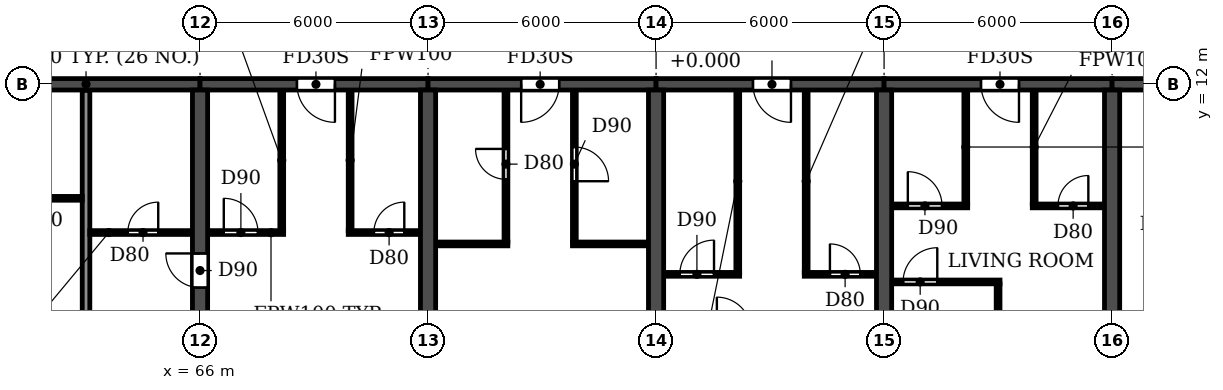
"""IFC4 building model, lengths in metres.
Left out: names, types, materials, properties, quantities, classifications, styles, units other than length and angle.
Written with IfcOpenShell. Run it as: python <this file> out.ifc"""

import sys

from ifc_helpers import new_model, si_unit, direction, frame, frame_2d, origin, place, context, subcontext, project, spatial, rectangle, extrude, element, fill, save


model = new_model("IFC4")
c1 = context("Model", 3, precision=1e-05, world=origin(), true_north=direction((0.0, 1.0)))
c2 = subcontext(c1, "Body", "Model", "MODEL_VIEW")
j1 = project(units=[si_unit("LENGTHUNIT", "METRE"), si_unit("PLANEANGLEUNIT", "RADIAN")], contexts=[c1])
p1 = place(None, origin())
s1 = spatial("IfcSite", under=j1, at=p1, CompositionType="ELEMENT")
p2 = place(p1, origin())
s2 = spatial("IfcBuilding", under=s1, at=p2, CompositionType="ELEMENT")
p3 = place(p2, frame((0.0, 0.0, 56.4)))
s3 = spatial("IfcBuildingStorey", under=s2, at=p3, CompositionType="ELEMENT", Elevation=56.4)
p4 = place(p3, frame((66.0, 0.2, 0.0), z_axis=(0.0, 0.0, 1.0), x_axis=(0.0, 1.0, 0.0)))
e1 = element("IfcWall", 1, at=p4, inside=s3, PredefinedType="SHEAR", context=c2, shape_type="SweptSolid", body=[
    extrude(rectangle(XDim=11.65, YDim=0.4, at=frame_2d((5.825, 0.0))), origin(), (0.0, 0.0, 1.0), 3.05),
])
p5 = place(p4, frame((6.45, 0.0, 0.0)))
e2 = element("IfcOpeningElement", 2, at=p5, cuts=e1, PredefinedType="OPENING", context=c2, shape_type="SweptSolid", body=[
    extrude(rectangle(XDim=0.9, YDim=2.1, at=frame_2d((0.45, 1.05))), frame((0.0, 0.21, 0.0), z_axis=(0.0, -1.0, 0.0), x_axis=(1.0, 0.0, 0.0)), (0.0, 0.0, 1.0), 0.42),
])
for number, where, z_axis, x_axis in (
    (3, (72.0, 0.2, 0.0), (0.0, 0.0, 1.0), (0.0, 1.0, 0.0)),
    (4, (78.0, 0.2, 0.0), (0.0, 0.0, 1.0), (0.0, 1.0, 0.0)),
    (5, (84.0, 0.2, 0.0), (0.0, 0.0, 1.0), (0.0, 1.0, 0.0)),
    (6, (90.0, 0.2, 0.0), (0.0, 0.0, 1.0), (0.0, 1.0, 0.0)),
):
    element("IfcWall", number, at=place(p3, frame(where, z_axis=z_axis, x_axis=x_axis)), inside=s3, PredefinedType="SHEAR", context=c2, shape_type="SweptSolid", body=[
        extrude(rectangle(XDim=11.65, YDim=0.4, at=frame_2d((5.825, 0.0))), origin(), (0.0, 0.0, 1.0), 3.05),
    ])
p6 = place(p3, frame((60.0, 12.0, 0.0), z_axis=(0.0, 0.0, 1.0), x_axis=(1.0, 0.0, 0.0)))
e7 = element("IfcWall", 7, at=p6, inside=s3, PredefinedType="SHEAR", context=c2, shape_type="SweptSolid", body=[
    extrude(rectangle(XDim=6.0, YDim=0.3, at=frame_2d((3.0, 0.0))), origin(), (0.0, 0.0, 1.0), 2.45),
])
p7 = place(p3, frame((66.0, 12.0, 0.0), z_axis=(0.0, 0.0, 1.0), x_axis=(1.0, 0.0, 0.0)))
e8 = element("IfcWall", 8, at=p7, inside=s3, PredefinedType="SHEAR", context=c2, shape_type="SweptSolid", body=[
    extrude(rectangle(XDim=6.0, YDim=0.3, at=frame_2d((3.0, 0.0))), origin(), (0.0, 0.0, 1.0), 2.45),
])
p8 = place(p7, frame((2.55, 0.0, 0.0)))
e9 = element("IfcOpeningElement", 9, at=p8, cuts=e8, PredefinedType="OPENING", context=c2, shape_type="SweptSolid", body=[
    extrude(rectangle(XDim=1.0, YDim=2.1, at=frame_2d((0.5, 1.05))), frame((0.0, 0.16, 0.0), z_axis=(0.0, -1.0, 0.0), x_axis=(1.0, 0.0, 0.0)), (0.0, 0.0, 1.0), 0.32),
])
p9 = place(p3, frame((72.0, 12.0, 0.0), z_axis=(0.0, 0.0, 1.0), x_axis=(1.0, 0.0, 0.0)))
e10 = element("IfcWall", 10, at=p9, inside=s3, PredefinedType="SHEAR", context=c2, shape_type="SweptSolid", body=[
    extrude(rectangle(XDim=6.0, YDim=0.3, at=frame_2d((3.0, 0.0))), origin(), (0.0, 0.0, 1.0), 2.45),
])
p10 = place(p9, frame((2.45, 0.0, 0.0)))
e11 = element("IfcOpeningElement", 11, at=p10, cuts=e10, PredefinedType="OPENING", context=c2, shape_type="SweptSolid", body=[
    extrude(rectangle(XDim=1.0, YDim=2.1, at=frame_2d((0.5, 1.05))), frame((0.0, 0.16, 0.0), z_axis=(0.0, -1.0, 0.0), x_axis=(1.0, 0.0, 0.0)), (0.0, 0.0, 1.0), 0.32),
])
p11 = place(p3, frame((78.0, 12.0, 0.0), z_axis=(0.0, 0.0, 1.0), x_axis=(1.0, 0.0, 0.0)))
e12 = element("IfcWall", 12, at=p11, inside=s3, PredefinedType="SHEAR", context=c2, shape_type="SweptSolid", body=[
    extrude(rectangle(XDim=6.0, YDim=0.3, at=frame_2d((3.0, 0.0))), origin(), (0.0, 0.0, 1.0), 2.45),
])
p12 = place(p11, frame((2.55, 0.0, 0.0)))
e13 = element("IfcOpeningElement", 13, at=p12, cuts=e12, PredefinedType="OPENING", context=c2, shape_type="SweptSolid", body=[
    extrude(rectangle(XDim=1.0, YDim=2.1, at=frame_2d((0.5, 1.05))), frame((0.0, 0.16, 0.0), z_axis=(0.0, -1.0, 0.0), x_axis=(1.0, 0.0, 0.0)), (0.0, 0.0, 1.0), 0.32),
])
p13 = place(p3, frame((84.0, 12.0, 0.0), z_axis=(0.0, 0.0, 1.0), x_axis=(1.0, 0.0, 0.0)))
e14 = element("IfcWall", 14, at=p13, inside=s3, PredefinedType="SHEAR", context=c2, shape_type="SweptSolid", body=[
    extrude(rectangle(XDim=6.0, YDim=0.3, at=frame_2d((3.0, 0.0))), origin(), (0.0, 0.0, 1.0), 2.45),
])
p14 = place(p13, frame((2.55, 0.0, 0.0)))
e15 = element("IfcOpeningElement", 15, at=p14, cuts=e14, PredefinedType="OPENING", context=c2, shape_type="SweptSolid", body=[
    extrude(rectangle(XDim=1.0, YDim=2.1, at=frame_2d((0.5, 1.05))), frame((0.0, 0.16, 0.0), z_axis=(0.0, -1.0, 0.0), x_axis=(1.0, 0.0, 0.0)), (0.0, 0.0, 1.0), 0.32),
])
p15 = place(p3, frame((90.0, 12.0, 0.0), z_axis=(0.0, 0.0, 1.0), x_axis=(1.0, 0.0, 0.0)))
e16 = element("IfcWall", 16, at=p15, inside=s3, PredefinedType="SHEAR", context=c2, shape_type="SweptSolid", body=[
    extrude(rectangle(XDim=5.8, YDim=0.3, at=frame_2d((2.9, 0.0))), origin(), (0.0, 0.0, 1.0), 2.45),
])
p16 = place(p15, frame((2.5, 0.0, 0.0)))
e17 = element("IfcOpeningElement", 17, at=p16, cuts=e16, PredefinedType="OPENING", context=c2, shape_type="SweptSolid", body=[
    extrude(rectangle(XDim=1.0, YDim=2.1, at=frame_2d((0.5, 1.05))), frame((0.0, 0.16, 0.0), z_axis=(0.0, -1.0, 0.0), x_axis=(1.0, 0.0, 0.0)), (0.0, 0.0, 1.0), 0.32),
])
p17 = place(p3, frame((63.0, 0.06, 0.0), z_axis=(0.0, 0.0, 1.0), x_axis=(0.0, 1.0, 0.0)))
e18 = element("IfcWall", 18, at=p17, inside=s3, PredefinedType="PARTITIONING", context=c2, shape_type="SweptSolid", body=[
    extrude(rectangle(XDim=11.78, YDim=0.2, at=frame_2d((5.89, 0.0))), origin(), (0.0, 0.0, 1.0), 3.05),
])
p18 = place(p3, frame((84.21, 6.8, 0.0), z_axis=(0.0, 0.0, 1.0), x_axis=(1.0, 0.0, 0.0)))
e19 = element("IfcWall", 19, at=p18, inside=s3, PredefinedType="PARTITIONING", context=c2, shape_type="SweptSolid", body=[
    extrude(rectangle(XDim=2.84, YDim=0.1, at=frame_2d((1.42, 0.0))), origin(), (0.0, 0.0, 1.0), 3.05),
])
p19 = place(p18, frame((0.29, 0.0, 0.0)))
e20 = element("IfcOpeningElement", 20, at=p19, cuts=e19, PredefinedType="OPENING", context=c2, shape_type="SweptSolid", body=[
    extrude(rectangle(XDim=0.9, YDim=2.1, at=frame_2d((0.45, 1.05))), frame((0.0, 0.06, 0.0), z_axis=(0.0, -1.0, 0.0), x_axis=(1.0, 0.0, 0.0)), (0.0, 0.0, 1.0), 0.12),
])
p20 = place(p3, frame((78.21, 7.0, 0.0), z_axis=(0.0, 0.0, 1.0), x_axis=(1.0, 0.0, 0.0)))
e21 = element("IfcWall", 21, at=p20, inside=s3, PredefinedType="PARTITIONING", context=c2, shape_type="SweptSolid", body=[
    extrude(rectangle(XDim=1.99, YDim=0.1, at=frame_2d((0.995, 0.0))), origin(), (0.0, 0.0, 1.0), 3.05),
])
p21 = place(p20, frame((0.415, 0.0, 0.0)))
e22 = element("IfcOpeningElement", 22, at=p21, cuts=e21, PredefinedType="OPENING", context=c2, shape_type="SweptSolid", body=[
    extrude(rectangle(XDim=0.9, YDim=2.1, at=frame_2d((0.45, 1.05))), frame((0.0, 0.06, 0.0), z_axis=(0.0, -1.0, 0.0), x_axis=(1.0, 0.0, 0.0)), (0.0, 0.0, 1.0), 0.12),
])
p22 = place(p3, frame((81.9, 7.0, 0.0), z_axis=(0.0, 0.0, 1.0), x_axis=(1.0, 0.0, 0.0)))
e23 = element("IfcWall", 23, at=p22, inside=s3, PredefinedType="PARTITIONING", context=c2, shape_type="SweptSolid", body=[
    extrude(rectangle(XDim=1.89, YDim=0.1, at=frame_2d((0.945, 0.0))), origin(), (0.0, 0.0, 1.0), 3.05),
])
p23 = place(p22, frame((0.675, 0.0, 0.0)))
e24 = element("IfcOpeningElement", 24, at=p23, cuts=e23, PredefinedType="OPENING", context=c2, shape_type="SweptSolid", body=[
    extrude(rectangle(XDim=0.8, YDim=2.1, at=frame_2d((0.4, 1.05))), frame((0.0, 0.06, 0.0), z_axis=(0.0, -1.0, 0.0), x_axis=(1.0, 0.0, 0.0)), (0.0, 0.0, 1.0), 0.12),
])
p24 = place(p3, frame((72.21, 7.8, 0.0), z_axis=(0.0, 0.0, 1.0), x_axis=(1.0, 0.0, 0.0)))
e25 = element("IfcWall", 25, at=p24, inside=s3, PredefinedType="PARTITIONING", context=c2, shape_type="SweptSolid", body=[
    extrude(rectangle(XDim=1.89, YDim=0.1, at=frame_2d((0.945, 0.0))), origin(), (0.0, 0.0, 1.0), 3.05),
])
p25 = place(p3, frame((75.8, 7.8, 0.0), z_axis=(0.0, 0.0, 1.0), x_axis=(1.0, 0.0, 0.0)))
e26 = element("IfcWall", 26, at=p25, inside=s3, PredefinedType="PARTITIONING", context=c2, shape_type="SweptSolid", body=[
    extrude(rectangle(XDim=1.99, YDim=0.1, at=frame_2d((0.995, 0.0))), origin(), (0.0, 0.0, 1.0), 3.05),
])
p26 = place(p3, frame((63.1, 8.1, 0.0), z_axis=(0.0, 0.0, 1.0), x_axis=(1.0, 0.0, 0.0)))
e27 = element("IfcWall", 27, at=p26, inside=s3, PredefinedType="PARTITIONING", context=c2, shape_type="SweptSolid", body=[
    extrude(rectangle(XDim=2.69, YDim=0.1, at=frame_2d((1.345, 0.0))), origin(), (0.0, 0.0, 1.0), 3.05),
])
p27 = place(p26, frame((1.0, 0.0, 0.0)))
e28 = element("IfcOpeningElement", 28, at=p27, cuts=e27, PredefinedType="OPENING", context=c2, shape_type="SweptSolid", body=[
    extrude(rectangle(XDim=0.8, YDim=2.1, at=frame_2d((0.4, 1.05))), frame((0.0, 0.06, 0.0), z_axis=(0.0, -1.0, 0.0), x_axis=(1.0, 0.0, 0.0)), (0.0, 0.0, 1.0), 0.12),
])
p28 = place(p3, frame((66.21, 8.1, 0.0), z_axis=(0.0, 0.0, 1.0), x_axis=(1.0, 0.0, 0.0)))
e29 = element("IfcWall", 29, at=p28, inside=s3, PredefinedType="PARTITIONING", context=c2, shape_type="SweptSolid", body=[
    extrude(rectangle(XDim=1.99, YDim=0.1, at=frame_2d((0.995, 0.0))), origin(), (0.0, 0.0, 1.0), 3.05),
])
p29 = place(p28, frame((0.415, 0.0, 0.0)))
e30 = element("IfcOpeningElement", 30, at=p29, cuts=e29, PredefinedType="OPENING", context=c2, shape_type="SweptSolid", body=[
    extrude(rectangle(XDim=0.9, YDim=2.1, at=frame_2d((0.45, 1.05))), frame((0.0, 0.06, 0.0), z_axis=(0.0, -1.0, 0.0), x_axis=(1.0, 0.0, 0.0)), (0.0, 0.0, 1.0), 0.12),
])
p30 = place(p3, frame((69.9, 8.1, 0.0), z_axis=(0.0, 0.0, 1.0), x_axis=(1.0, 0.0, 0.0)))
e31 = element("IfcWall", 31, at=p30, inside=s3, PredefinedType="PARTITIONING", context=c2, shape_type="SweptSolid", body=[
    extrude(rectangle(XDim=1.89, YDim=0.1, at=frame_2d((0.945, 0.0))), origin(), (0.0, 0.0, 1.0), 3.05),
])
p31 = place(p30, frame((0.675, 0.0, 0.0)))
e32 = element("IfcOpeningElement", 32, at=p31, cuts=e31, PredefinedType="OPENING", context=c2, shape_type="SweptSolid", body=[
    extrude(rectangle(XDim=0.8, YDim=2.1, at=frame_2d((0.4, 1.05))), frame((0.0, 0.06, 0.0), z_axis=(0.0, -1.0, 0.0), x_axis=(1.0, 0.0, 0.0)), (0.0, 0.0, 1.0), 0.12),
])
p32 = place(p3, frame((84.21, 8.8, 0.0), z_axis=(0.0, 0.0, 1.0), x_axis=(1.0, 0.0, 0.0)))
e33 = element("IfcWall", 33, at=p32, inside=s3, PredefinedType="PARTITIONING", context=c2, shape_type="SweptSolid", body=[
    extrude(rectangle(XDim=1.99, YDim=0.1, at=frame_2d((0.995, 0.0))), origin(), (0.0, 0.0, 1.0), 3.05),
])
p33 = place(p32, frame((0.415, 0.0, 0.0)))
e34 = element("IfcOpeningElement", 34, at=p33, cuts=e33, PredefinedType="OPENING", context=c2, shape_type="SweptSolid", body=[
    extrude(rectangle(XDim=0.9, YDim=2.1, at=frame_2d((0.45, 1.05))), frame((0.0, 0.06, 0.0), z_axis=(0.0, -1.0, 0.0), x_axis=(1.0, 0.0, 0.0)), (0.0, 0.0, 1.0), 0.12),
])
p34 = place(p3, frame((87.9, 8.8, 0.0), z_axis=(0.0, 0.0, 1.0), x_axis=(1.0, 0.0, 0.0)))
e35 = element("IfcWall", 35, at=p34, inside=s3, PredefinedType="PARTITIONING", context=c2, shape_type="SweptSolid", body=[
    extrude(rectangle(XDim=1.89, YDim=0.1, at=frame_2d((0.945, 0.0))), origin(), (0.0, 0.0, 1.0), 3.05),
])
p35 = place(p34, frame((0.675, 0.0, 0.0)))
e36 = element("IfcOpeningElement", 36, at=p35, cuts=e35, PredefinedType="OPENING", context=c2, shape_type="SweptSolid", body=[
    extrude(rectangle(XDim=0.8, YDim=2.1, at=frame_2d((0.4, 1.05))), frame((0.0, 0.06, 0.0), z_axis=(0.0, -1.0, 0.0), x_axis=(1.0, 0.0, 0.0)), (0.0, 0.0, 1.0), 0.12),
])
p36 = place(p3, frame((60.21, 9.0, 0.0), z_axis=(0.0, 0.0, 1.0), x_axis=(1.0, 0.0, 0.0)))
e37 = element("IfcWall", 37, at=p36, inside=s3, PredefinedType="PARTITIONING", context=c2, shape_type="SweptSolid", body=[
    extrude(rectangle(XDim=2.69, YDim=0.1, at=frame_2d((1.345, 0.0))), origin(), (0.0, 0.0, 1.0), 3.05),
])
p37 = place(p36, frame((0.89, 0.0, 0.0)))
e38 = element("IfcOpeningElement", 38, at=p37, cuts=e37, PredefinedType="OPENING", context=c2, shape_type="SweptSolid", body=[
    extrude(rectangle(XDim=0.8, YDim=2.1, at=frame_2d((0.4, 1.05))), frame((0.0, 0.06, 0.0), z_axis=(0.0, -1.0, 0.0), x_axis=(1.0, 0.0, 0.0)), (0.0, 0.0, 1.0), 0.12),
])
for number, where, z_axis, x_axis in (
    (39, (68.15, 8.15, 0.0), (0.0, 0.0, 1.0), (0.0, 1.0, 0.0)),
    (40, (69.95, 8.15, 0.0), (0.0, 0.0, 1.0), (0.0, 1.0, 0.0)),
):
    element("IfcWall", number, at=place(p3, frame(where, z_axis=z_axis, x_axis=x_axis)), inside=s3, PredefinedType="PARTITIONING", context=c2, shape_type="SweptSolid", body=[
        extrude(rectangle(XDim=3.69, YDim=0.1, at=frame_2d((1.845, 0.0))), origin(), (0.0, 0.0, 1.0), 3.05),
    ])
p38 = place(p3, frame((74.05, 7.85, 0.0), z_axis=(0.0, 0.0, 1.0), x_axis=(0.0, 1.0, 0.0)))
e41 = element("IfcWall", 41, at=p38, inside=s3, PredefinedType="PARTITIONING", context=c2, shape_type="SweptSolid", body=[
    extrude(rectangle(XDim=3.99, YDim=0.1, at=frame_2d((1.995, 0.0))), origin(), (0.0, 0.0, 1.0), 3.05),
])
p39 = place(p38, frame((1.65, 0.0, 0.0)))
e42 = element("IfcOpeningElement", 42, at=p39, cuts=e41, PredefinedType="OPENING", context=c2, shape_type="SweptSolid", body=[
    extrude(rectangle(XDim=0.8, YDim=2.1, at=frame_2d((0.4, 1.05))), frame((0.0, 0.06, 0.0), z_axis=(0.0, -1.0, 0.0), x_axis=(1.0, 0.0, 0.0)), (0.0, 0.0, 1.0), 0.12),
])
p40 = place(p3, frame((75.85, 7.85, 0.0), z_axis=(0.0, 0.0, 1.0), x_axis=(0.0, 1.0, 0.0)))
e43 = element("IfcWall", 43, at=p40, inside=s3, PredefinedType="PARTITIONING", context=c2, shape_type="SweptSolid", body=[
    extrude(rectangle(XDim=3.99, YDim=0.1, at=frame_2d((1.995, 0.0))), origin(), (0.0, 0.0, 1.0), 3.05),
])
p41 = place(p40, frame((1.6, 0.0, 0.0)))
e44 = element("IfcOpeningElement", 44, at=p41, cuts=e43, PredefinedType="OPENING", context=c2, shape_type="SweptSolid", body=[
    extrude(rectangle(XDim=0.9, YDim=2.1, at=frame_2d((0.45, 1.05))), frame((0.0, 0.06, 0.0), z_axis=(0.0, -1.0, 0.0), x_axis=(1.0, 0.0, 0.0)), (0.0, 0.0, 1.0), 0.12),
])
for number, where, z_axis, x_axis in (
    (45, (80.15, 7.05, 0.0), (0.0, 0.0, 1.0), (0.0, 1.0, 0.0)),
    (46, (81.95, 7.05, 0.0), (0.0, 0.0, 1.0), (0.0, 1.0, 0.0)),
):
    element("IfcWall", number, at=place(p3, frame(where, z_axis=z_axis, x_axis=x_axis)), inside=s3, PredefinedType="PARTITIONING", context=c2, shape_type="SweptSolid", body=[
        extrude(rectangle(XDim=4.79, YDim=0.1, at=frame_2d((2.395, 0.0))), origin(), (0.0, 0.0, 1.0), 3.05),
    ])
p42 = place(p3, frame((86.15, 8.85, 0.0), z_axis=(0.0, 0.0, 1.0), x_axis=(0.0, 1.0, 0.0)))
e47 = element("IfcWall", 47, at=p42, inside=s3, PredefinedType="PARTITIONING", context=c2, shape_type="SweptSolid", body=[
    extrude(rectangle(XDim=2.99, YDim=0.1, at=frame_2d((1.495, 0.0))), origin(), (0.0, 0.0, 1.0), 3.05),
])
p43 = place(p3, frame((87.0, 0.06, 0.0), z_axis=(0.0, 0.0, 1.0), x_axis=(0.0, 1.0, 0.0)))
e48 = element("IfcWall", 48, at=p43, inside=s3, PredefinedType="PARTITIONING", context=c2, shape_type="SweptSolid", body=[
    extrude(rectangle(XDim=6.69, YDim=0.1, at=frame_2d((3.345, 0.0))), origin(), (0.0, 0.0, 1.0), 3.05),
])
p44 = place(p3, frame((87.95, 8.85, 0.0), z_axis=(0.0, 0.0, 1.0), x_axis=(0.0, 1.0, 0.0)))
e49 = element("IfcWall", 49, at=p44, inside=s3, PredefinedType="PARTITIONING", context=c2, shape_type="SweptSolid", body=[
    extrude(rectangle(XDim=2.99, YDim=0.1, at=frame_2d((1.495, 0.0))), origin(), (0.0, 0.0, 1.0), 3.05),
])
p45 = place(p27, origin())
e50 = element("IfcDoor", 50, at=p45, inside=s3, OperationType="SINGLE_SWING_RIGHT", PredefinedType="DOOR", context=c2, shape_type="SweptSolid", body=[
    extrude(rectangle(XDim=0.8, YDim=2.1, at=frame_2d((0.4, 1.05))), frame((0.0, 0.025, 0.0), z_axis=(0.0, -1.0, 0.0), x_axis=(1.0, 0.0, 0.0)), (0.0, 0.0, 1.0), 0.05),
])
fill(e28, e50)
p46 = place(p5, origin())
e51 = element("IfcDoor", 51, at=p46, inside=s3, OperationType="SINGLE_SWING_RIGHT", PredefinedType="DOOR", context=c2, shape_type="SweptSolid", body=[
    extrude(rectangle(XDim=0.9, YDim=2.1, at=frame_2d((0.45, 1.05))), frame((0.0, 0.025, 0.0), z_axis=(0.0, -1.0, 0.0), x_axis=(1.0, 0.0, 0.0)), (0.0, 0.0, 1.0), 0.05),
])
fill(e2, e51)
p47 = place(p29, origin())
e52 = element("IfcDoor", 52, at=p47, inside=s3, OperationType="SINGLE_SWING_LEFT", PredefinedType="DOOR", context=c2, shape_type="SweptSolid", body=[
    extrude(rectangle(XDim=0.9, YDim=2.1, at=frame_2d((0.45, 1.05))), frame((0.0, 0.025, 0.0), z_axis=(0.0, -1.0, 0.0), x_axis=(1.0, 0.0, 0.0)), (0.0, 0.0, 1.0), 0.05),
])
fill(e30, e52)
p48 = place(p8, frame((1.0, 0.0, 0.0), z_axis=(0.0, 0.0, 1.0), x_axis=(-1.0, 0.0, 0.0)))
e53 = element("IfcDoor", 53, at=p48, inside=s3, OperationType="SINGLE_SWING_LEFT", PredefinedType="DOOR", context=c2, shape_type="SweptSolid", body=[
    extrude(rectangle(XDim=1.0, YDim=2.1, at=frame_2d((0.5, 1.05))), frame((0.0, 0.025, 0.0), z_axis=(0.0, -1.0, 0.0), x_axis=(1.0, 0.0, 0.0)), (0.0, 0.0, 1.0), 0.05),
])
fill(e9, e53)
p49 = place(p31, origin())
e54 = element("IfcDoor", 54, at=p49, inside=s3, OperationType="SINGLE_SWING_RIGHT", PredefinedType="DOOR", context=c2, shape_type="SweptSolid", body=[
    extrude(rectangle(XDim=0.8, YDim=2.1, at=frame_2d((0.4, 1.05))), frame((0.0, 0.025, 0.0), z_axis=(0.0, -1.0, 0.0), x_axis=(1.0, 0.0, 0.0)), (0.0, 0.0, 1.0), 0.05),
])
fill(e32, e54)
p50 = place(p39, origin())
e55 = element("IfcDoor", 55, at=p50, inside=s3, OperationType="SINGLE_SWING_RIGHT", PredefinedType="DOOR", context=c2, shape_type="SweptSolid", body=[
    extrude(rectangle(XDim=0.8, YDim=2.1, at=frame_2d((0.4, 1.05))), frame((0.0, 0.025, 0.0), z_axis=(0.0, -1.0, 0.0), x_axis=(1.0, 0.0, 0.0)), (0.0, 0.0, 1.0), 0.05),
])
fill(e42, e55)
p51 = place(p10, frame((1.0, 0.0, 0.0), z_axis=(0.0, 0.0, 1.0), x_axis=(-1.0, 0.0, 0.0)))
e56 = element("IfcDoor", 56, at=p51, inside=s3, OperationType="SINGLE_SWING_RIGHT", PredefinedType="DOOR", context=c2, shape_type="SweptSolid", body=[
    extrude(rectangle(XDim=1.0, YDim=2.1, at=frame_2d((0.5, 1.05))), frame((0.0, 0.025, 0.0), z_axis=(0.0, -1.0, 0.0), x_axis=(1.0, 0.0, 0.0)), (0.0, 0.0, 1.0), 0.05),
])
fill(e11, e56)
p52 = place(p41, frame((0.9, 0.0, 0.0), z_axis=(0.0, 0.0, 1.0), x_axis=(-1.0, 0.0, 0.0)))
e57 = element("IfcDoor", 57, at=p52, inside=s3, OperationType="SINGLE_SWING_RIGHT", PredefinedType="DOOR", context=c2, shape_type="SweptSolid", body=[
    extrude(rectangle(XDim=0.9, YDim=2.1, at=frame_2d((0.45, 1.05))), frame((0.0, 0.025, 0.0), z_axis=(0.0, -1.0, 0.0), x_axis=(1.0, 0.0, 0.0)), (0.0, 0.0, 1.0), 0.05),
])
fill(e44, e57)
p53 = place(p21, origin())
e58 = element("IfcDoor", 58, at=p53, inside=s3, OperationType="SINGLE_SWING_RIGHT", PredefinedType="DOOR", context=c2, shape_type="SweptSolid", body=[
    extrude(rectangle(XDim=0.9, YDim=2.1, at=frame_2d((0.45, 1.05))), frame((0.0, 0.025, 0.0), z_axis=(0.0, -1.0, 0.0), x_axis=(1.0, 0.0, 0.0)), (0.0, 0.0, 1.0), 0.05),
])
fill(e22, e58)
p54 = place(p12, frame((1.0, 0.0, 0.0), z_axis=(0.0, 0.0, 1.0), x_axis=(-1.0, 0.0, 0.0)))
e59 = element("IfcDoor", 59, at=p54, inside=s3, OperationType="SINGLE_SWING_LEFT", PredefinedType="DOOR", context=c2, shape_type="SweptSolid", body=[
    extrude(rectangle(XDim=1.0, YDim=2.1, at=frame_2d((0.5, 1.05))), frame((0.0, 0.025, 0.0), z_axis=(0.0, -1.0, 0.0), x_axis=(1.0, 0.0, 0.0)), (0.0, 0.0, 1.0), 0.05),
])
fill(e13, e59)
p55 = place(p23, origin())
e60 = element("IfcDoor", 60, at=p55, inside=s3, OperationType="SINGLE_SWING_LEFT", PredefinedType="DOOR", context=c2, shape_type="SweptSolid", body=[
    extrude(rectangle(XDim=0.8, YDim=2.1, at=frame_2d((0.4, 1.05))), frame((0.0, 0.025, 0.0), z_axis=(0.0, -1.0, 0.0), x_axis=(1.0, 0.0, 0.0)), (0.0, 0.0, 1.0), 0.05),
])
fill(e24, e60)
p56 = place(p19, origin())
e61 = element("IfcDoor", 61, at=p56, inside=s3, OperationType="SINGLE_SWING_RIGHT", PredefinedType="DOOR", context=c2, shape_type="SweptSolid", body=[
    extrude(rectangle(XDim=0.9, YDim=2.1, at=frame_2d((0.45, 1.05))), frame((0.0, 0.025, 0.0), z_axis=(0.0, -1.0, 0.0), x_axis=(1.0, 0.0, 0.0)), (0.0, 0.0, 1.0), 0.05),
])
fill(e20, e61)
p57 = place(p33, origin())
e62 = element("IfcDoor", 62, at=p57, inside=s3, OperationType="SINGLE_SWING_LEFT", PredefinedType="DOOR", context=c2, shape_type="SweptSolid", body=[
    extrude(rectangle(XDim=0.9, YDim=2.1, at=frame_2d((0.45, 1.05))), frame((0.0, 0.025, 0.0), z_axis=(0.0, -1.0, 0.0), x_axis=(1.0, 0.0, 0.0)), (0.0, 0.0, 1.0), 0.05),
])
fill(e34, e62)
p58 = place(p14, frame((1.0, 0.0, 0.0), z_axis=(0.0, 0.0, 1.0), x_axis=(-1.0, 0.0, 0.0)))
e63 = element("IfcDoor", 63, at=p58, inside=s3, OperationType="SINGLE_SWING_LEFT", PredefinedType="DOOR", context=c2, shape_type="SweptSolid", body=[
    extrude(rectangle(XDim=1.0, YDim=2.1, at=frame_2d((0.5, 1.05))), frame((0.0, 0.025, 0.0), z_axis=(0.0, -1.0, 0.0), x_axis=(1.0, 0.0, 0.0)), (0.0, 0.0, 1.0), 0.05),
])
fill(e15, e63)
p59 = place(p35, origin())
e64 = element("IfcDoor", 64, at=p59, inside=s3, OperationType="SINGLE_SWING_RIGHT", PredefinedType="DOOR", context=c2, shape_type="SweptSolid", body=[
    extrude(rectangle(XDim=0.8, YDim=2.1, at=frame_2d((0.4, 1.05))), frame((0.0, 0.025, 0.0), z_axis=(0.0, -1.0, 0.0), x_axis=(1.0, 0.0, 0.0)), (0.0, 0.0, 1.0), 0.05),
])
fill(e36, e64)
save(model, sys.argv[1])
